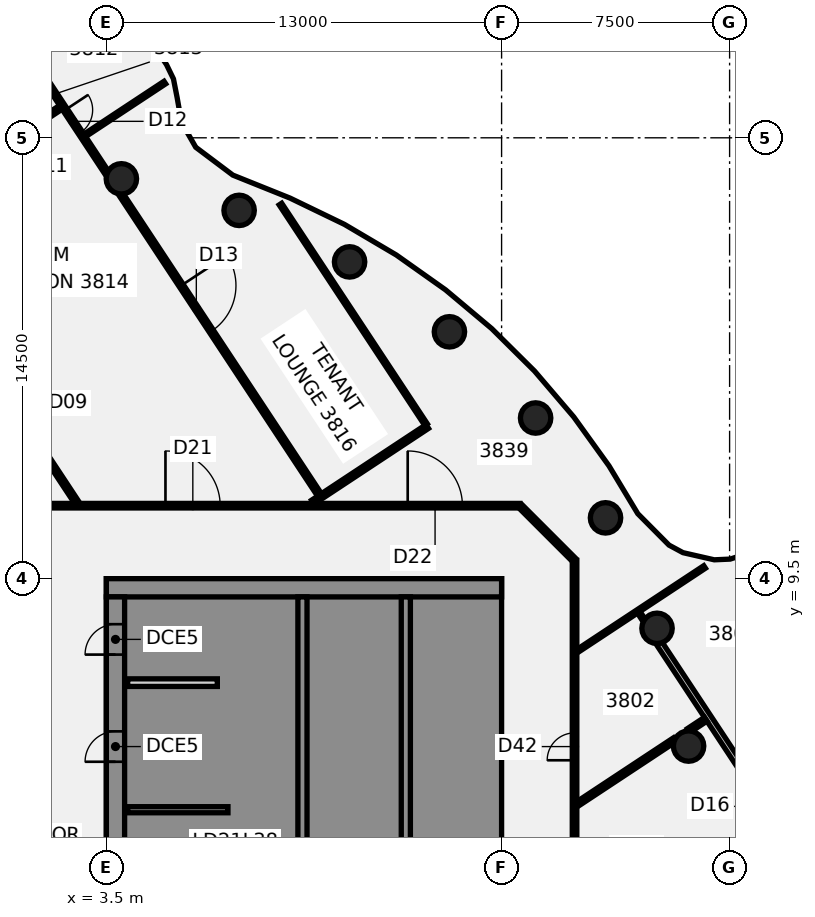
"""IFC4 building model, lengths in metres.
Left out: names, types, materials, properties, quantities, classifications, styles, units other than length and angle.
Written with IfcOpenShell. Run it as: python <this file> out.ifc"""

import sys

from ifc_helpers import new_model, si_unit, direction, frame, frame_2d, origin, origin_2d, place, context, subcontext, project, spatial, polyline, rectangle, circle, outline, extrude, element, fill, save


model = new_model("IFC4")
c1 = context("Model", 3, precision=1e-05, world=origin(), true_north=direction((0.0, 1.0)))
c2 = subcontext(c1, "Body", "Model", "MODEL_VIEW")
j1 = project(units=[si_unit("LENGTHUNIT", "METRE"), si_unit("PLANEANGLEUNIT", "RADIAN")], contexts=[c1])
p1 = place(None, origin())
s1 = spatial("IfcSite", under=j1, at=p1, CompositionType="ELEMENT")
p2 = place(p1, origin())
s2 = spatial("IfcBuilding", under=s1, at=p2, CompositionType="ELEMENT")
p3 = place(p2, frame((0.0, 0.0, 155.5)))
s3 = spatial("IfcBuildingStorey", under=s2, at=p3, CompositionType="ELEMENT", Elevation=155.5)
for number, where, z_axis, x_axis in (
    (1, (22.651, 3.994, -0.14), (0.0, 0.0, 1.0), (1.0, 0.0, 0.0)),
    (2, (21.613, 7.866, -0.14), (0.0, 0.0, 1.0), (1.0, 0.0, 0.0)),
    (3, (19.919, 11.5, -0.14), (0.0, 0.0, 1.0), (1.0, 0.0, 0.0)),
    (4, (17.619, 14.784, -0.14), (0.0, 0.0, 1.0), (1.0, 0.0, 0.0)),
    (5, (14.784, 17.619, -0.14), (0.0, 0.0, 1.0), (1.0, 0.0, 0.0)),
    (6, (11.5, 19.919, -0.14), (0.0, 0.0, 1.0), (1.0, 0.0, 0.0)),
    (7, (7.866, 21.613, -0.14), (0.0, 0.0, 1.0), (1.0, 0.0, 0.0)),
    (8, (3.994, 22.651, -0.14), (0.0, 0.0, 1.0), (1.0, 0.0, 0.0)),
):
    element("IfcColumn", number, at=place(p3, frame(where, z_axis=z_axis, x_axis=x_axis)), inside=s3, PredefinedType="COLUMN", context=c2, shape_type="SweptSolid", body=[
        extrude(circle(Radius=0.5, at=origin_2d()), origin(), (0.0, 0.0, 1.0), 3.75),
    ])
p4 = place(p3, frame((-3.565, 21.228, 0.0), z_axis=(0.0, 0.0, 1.0), x_axis=(0.55097538213, -0.834521496599, 0.0)))
e9 = element("IfcWall", 9, at=p4, inside=s3, PredefinedType="PARTITIONING", context=c2, shape_type="SweptSolid", body=[
    extrude(rectangle(XDim=11.058, YDim=0.15, at=frame_2d((5.529, 0.0))), origin(), (0.0, 0.0, 1.0), 3.01),
])
p5 = place(p4, frame((6.67, 0.0, 0.0)))
e10 = element("IfcOpeningElement", 10, at=p5, cuts=e9, PredefinedType="OPENING", context=c2, shape_type="SweptSolid", body=[
    extrude(rectangle(XDim=0.9, YDim=2.1, at=frame_2d((0.45, 1.05))), frame((0.0, 0.085, 0.0), z_axis=(0.0, -1.0, 0.0), x_axis=(1.0, 0.0, 0.0)), (0.0, 0.0, 1.0), 0.17),
])
p6 = place(p3, frame((0.799, 26.961, 0.0), z_axis=(0.0, 0.0, 1.0), x_axis=(0.55102221272, -0.834490575794, 0.0)))
e11 = element("IfcWall", 11, at=p6, inside=s3, PredefinedType="PARTITIONING", context=c2, shape_type="SweptSolid", body=[
    extrude(rectangle(XDim=5.139, YDim=0.15, at=frame_2d((2.57, 0.0))), origin(), (0.0, 0.0, 1.0), 3.01),
])
p7 = place(p6, frame((2.449, 0.0, 0.0)))
e12 = element("IfcOpeningElement", 12, at=p7, cuts=e11, PredefinedType="OPENING", context=c2, shape_type="SweptSolid", body=[
    extrude(rectangle(XDim=0.9, YDim=2.1, at=frame_2d((0.45, 1.05))), frame((0.0, 0.085, 0.0), z_axis=(0.0, -1.0, 0.0), x_axis=(1.0, 0.0, 0.0)), (0.0, 0.0, 1.0), 0.17),
])
p8 = place(p3, frame((3.879, 22.297, 0.0), z_axis=(0.0, 0.0, 1.0), x_axis=(0.551037271507, -0.834480632136, 0.0)))
e13 = element("IfcWall", 13, at=p8, inside=s3, PredefinedType="PARTITIONING", context=c2, shape_type="SweptSolid", body=[
    extrude(rectangle(XDim=12.03, YDim=0.15, at=frame_2d((6.015, 0.0))), origin(), (0.0, 0.0, 1.0), 3.01),
])
p9 = place(p8, frame((3.782, 0.0, 0.0)))
e14 = element("IfcOpeningElement", 14, at=p9, cuts=e13, PredefinedType="OPENING", context=c2, shape_type="SweptSolid", body=[
    extrude(rectangle(XDim=1.8, YDim=2.1, at=frame_2d((0.9, 1.05))), frame((0.0, 0.085, 0.0), z_axis=(0.0, -1.0, 0.0), x_axis=(1.0, 0.0, 0.0)), (0.0, 0.0, 1.0), 0.17),
])
p10 = place(p3, frame((9.226, 21.82, 0.0), z_axis=(0.0, 0.0, 1.0), x_axis=(0.550974071804, -0.834522361713, 0.0)))
e15 = element("IfcWall", 15, at=p10, inside=s3, PredefinedType="PARTITIONING", context=c2, shape_type="SweptSolid", body=[
    extrude(rectangle(XDim=8.692, YDim=0.1, at=frame_2d((4.346, 0.0))), origin(), (0.0, 0.0, 1.0), 3.01),
])
p11 = place(p3, frame((21.011, 8.394, 0.0), z_axis=(0.0, 0.0, 1.0), x_axis=(0.551266985396, -0.834328898464, 0.0)))
e16 = element("IfcWall", 16, at=p11, inside=s3, PredefinedType="PARTITIONING", context=c2, shape_type="SweptSolid", body=[
    extrude(rectangle(XDim=0.312, YDim=0.1, at=frame_2d((0.156, 0.0))), origin(), (0.0, 0.0, 1.0), 3.01),
])
p12 = place(p3, frame((21.684, 7.375, 0.0), z_axis=(0.0, 0.0, 1.0), x_axis=(0.550962555751, -0.834529964806, 0.0)))
e17 = element("IfcWall", 17, at=p12, inside=s3, PredefinedType="PARTITIONING", context=c2, shape_type="SweptSolid", body=[
    extrude(rectangle(XDim=13.028, YDim=0.2, at=frame_2d((6.514, 0.0))), origin(), (0.0, 0.0, 1.0), 3.01),
])
p13 = place(p12, frame((5.729, 0.0, 0.0)))
e18 = element("IfcOpeningElement", 18, at=p13, cuts=e17, PredefinedType="OPENING", context=c2, shape_type="SweptSolid", body=[
    extrude(rectangle(XDim=1.4, YDim=2.1, at=frame_2d((0.7, 1.05))), frame((0.0, 0.11, 0.0), z_axis=(0.0, -1.0, 0.0), x_axis=(1.0, 0.0, 0.0)), (0.0, 0.0, 1.0), 0.22),
])
p14 = place(p3, frame((17.128, 11.872, 0.0), z_axis=(0.0, 0.0, 1.0), x_axis=(0.707106781187, -0.707106781187, 0.0)))
e19 = element("IfcWall", 19, at=p14, inside=s3, PredefinedType="PARTITIONING", context=c2, shape_type="SweptSolid", body=[
    extrude(rectangle(XDim=2.465, YDim=0.15, at=frame_2d((1.232, 0.0))), origin(), (0.0, 0.0, 1.0), 3.01),
])
p15 = place(p3, frame((-17.065, 11.9, 0.0), z_axis=(0.0, 0.0, 1.0), x_axis=(1.0, 0.0, 0.0)))
e20 = element("IfcWall", 20, at=p15, inside=s3, PredefinedType="PARTITIONING", context=c2, shape_type="SweptSolid", body=[
    extrude(rectangle(XDim=34.165, YDim=0.15, at=frame_2d((17.083, 0.0))), origin(), (0.0, 0.0, 1.0), 3.01),
])
p16 = place(p15, frame((22.509, 0.0, 0.0)))
e21 = element("IfcOpeningElement", 21, at=p16, cuts=e20, PredefinedType="OPENING", context=c2, shape_type="SweptSolid", body=[
    extrude(rectangle(XDim=1.8, YDim=2.1, at=frame_2d((0.9, 1.05))), frame((0.0, 0.085, 0.0), z_axis=(0.0, -1.0, 0.0), x_axis=(1.0, 0.0, 0.0)), (0.0, 0.0, 1.0), 0.17),
])
p17 = place(p15, frame((30.477, 0.0, 0.0)))
e22 = element("IfcOpeningElement", 22, at=p17, cuts=e20, PredefinedType="OPENING", context=c2, shape_type="SweptSolid", body=[
    extrude(rectangle(XDim=1.8, YDim=2.1, at=frame_2d((0.9, 1.05))), frame((0.0, 0.085, 0.0), z_axis=(0.0, -1.0, 0.0), x_axis=(1.0, 0.0, 0.0)), (0.0, 0.0, 1.0), 0.17),
])
p18 = place(p15, frame((8.334, 0.0, 0.0)))
e23 = element("IfcOpeningElement", 23, at=p18, cuts=e20, PredefinedType="OPENING", context=c2, shape_type="SweptSolid", body=[
    extrude(rectangle(XDim=1.8, YDim=2.1, at=frame_2d((0.9, 1.05))), frame((0.0, 0.085, 0.0), z_axis=(0.0, -1.0, 0.0), x_axis=(1.0, 0.0, 0.0)), (0.0, 0.0, 1.0), 0.17),
])
p19 = place(p3, frame((2.795, 24.082, 0.0), z_axis=(0.0, 0.0, 1.0), x_axis=(0.83472341034, 0.550669436441, 0.0)))
e24 = element("IfcWall", 24, at=p19, inside=s3, PredefinedType="PARTITIONING", context=c2, shape_type="SweptSolid", body=[
    extrude(rectangle(XDim=3.15, YDim=0.1, at=frame_2d((1.575, 0.0))), origin(), (0.0, 0.0, 1.0), 3.01),
])
p20 = place(p3, frame((-7.567, 21.559, 0.0), z_axis=(0.0, 0.0, 1.0), x_axis=(0.834644793963, 0.55078858731, 0.0)))
e25 = element("IfcWall", 25, at=p20, inside=s3, PredefinedType="PARTITIONING", context=c2, shape_type="SweptSolid", body=[
    extrude(rectangle(XDim=13.257, YDim=0.2, at=frame_2d((6.629, 0.0))), origin(), (0.0, 0.0, 1.0), 3.01),
])
p21 = place(p20, frame((5.658, 0.0, 0.0)))
e26 = element("IfcOpeningElement", 26, at=p21, cuts=e25, PredefinedType="OPENING", context=c2, shape_type="SweptSolid", body=[
    extrude(rectangle(XDim=1.4, YDim=2.1, at=frame_2d((0.7, 1.05))), frame((0.0, 0.11, 0.0), z_axis=(0.0, -1.0, 0.0), x_axis=(1.0, 0.0, 0.0)), (0.0, 0.0, 1.0), 0.22),
])
p22 = place(p3, frame((0.396, 23.941, 0.0), z_axis=(0.0, 0.0, 1.0), x_axis=(0.834370825501, 0.551203524619, 0.0)))
e27 = element("IfcWall", 27, at=p22, inside=s3, PredefinedType="PARTITIONING", context=c2, shape_type="SweptSolid", body=[
    extrude(rectangle(XDim=1.92, YDim=0.15, at=frame_2d((0.96, 0.0))), origin(), (0.0, 0.0, 1.0), 3.01),
])
p23 = place(p3, frame((10.292, 12.019, 0.0), z_axis=(0.0, 0.0, 1.0), x_axis=(0.834523303169, 0.550972645844, 0.0)))
e28 = element("IfcWall", 28, at=p23, inside=s3, PredefinedType="PARTITIONING", context=c2, shape_type="SweptSolid", body=[
    extrude(rectangle(XDim=4.511, YDim=0.15, at=frame_2d((2.255, 0.0))), origin(), (0.0, 0.0, 1.0), 3.01),
])
p24 = place(p3, frame((19.0, 2.093, 0.0), z_axis=(0.0, 0.0, 1.0), x_axis=(0.834493361806, 0.551017993446, 0.0)))
e29 = element("IfcWall", 29, at=p24, inside=s3, PredefinedType="PARTITIONING", context=c2, shape_type="SweptSolid", body=[
    extrude(rectangle(XDim=3.831, YDim=0.15, at=frame_2d((1.916, 0.0))), origin(), (0.0, 0.0, 1.0), 3.01),
])
p25 = place(p3, frame((22.651, 4.504, 0.0), z_axis=(0.0, 0.0, 1.0), x_axis=(0.834599435949, 0.550857315022, 0.0)))
e30 = element("IfcWall", 30, at=p25, inside=s3, PredefinedType="PARTITIONING", context=c2, shape_type="SweptSolid", body=[
    extrude(rectangle(XDim=0.676, YDim=0.15, at=frame_2d((0.338, 0.0))), origin(), (0.0, 0.0, 1.0), 3.01),
])
p26 = place(p3, frame((18.983, 7.115, 0.0), z_axis=(0.0, 0.0, 1.0), x_axis=(0.834486104681, 0.551028983898, 0.0)))
e31 = element("IfcWall", 31, at=p26, inside=s3, PredefinedType="PARTITIONING", context=c2, shape_type="SweptSolid", body=[
    extrude(rectangle(XDim=5.026, YDim=0.1, at=frame_2d((2.513, 0.0))), origin(), (0.0, 0.0, 1.0), 3.01),
])
p27 = place(p3, frame((18.9, -10.1, 0.0), z_axis=(0.0, 0.0, 1.0), x_axis=(0.0, 1.0, 0.0)))
e32 = element("IfcWall", 32, at=p27, inside=s3, PredefinedType="PARTITIONING", context=c2, shape_type="SweptSolid", body=[
    extrude(rectangle(XDim=20.2, YDim=0.15, at=frame_2d((10.1, 0.0))), origin(), (0.0, 0.0, 1.0), 3.01),
])
p28 = place(p27, frame((8.179, 0.0, 0.0)))
e33 = element("IfcOpeningElement", 33, at=p28, cuts=e32, PredefinedType="OPENING", context=c2, shape_type="SweptSolid", body=[
    extrude(rectangle(XDim=1.8, YDim=2.1, at=frame_2d((0.9, 1.05))), frame((0.0, 0.085, 0.0), z_axis=(0.0, -1.0, 0.0), x_axis=(1.0, 0.0, 0.0)), (0.0, 0.0, 1.0), 0.17),
])
p29 = place(p27, frame((13.627, 0.0, 0.0)))
e34 = element("IfcOpeningElement", 34, at=p29, cuts=e32, PredefinedType="OPENING", context=c2, shape_type="SweptSolid", body=[
    extrude(rectangle(XDim=0.9, YDim=2.1, at=frame_2d((0.45, 1.05))), frame((0.0, 0.085, 0.0), z_axis=(0.0, -1.0, 0.0), x_axis=(1.0, 0.0, 0.0)), (0.0, 0.0, 1.0), 0.17),
])
p30 = place(p3, origin())
e35 = element("IfcWall", 35, at=p30, inside=s3, PredefinedType="SHEAR", context=c2, shape_type="SweptSolid", body=[
    extrude(outline(polyline([(13.5, -8.125), (13.5, -8.9), (15.9, -8.9), (16.5, -8.9), (16.5, 8.9), (15.9, 8.9), (13.5, 8.9), (13.5, 8.125), (15.9, 8.125), (15.9, 5.625), (13.5, 5.625), (13.5, 5.375), (15.9, 5.375), (15.9, -5.375), (13.5, -5.375), (13.5, -5.625), (15.9, -5.625), (15.9, -8.125), (13.5, -8.125)])), origin(), (0.0, 0.0, 1.0), 3.61),
])
p31 = place(p3, frame((16.5, 9.2, 0.0), z_axis=(0.0, 0.0, 1.0), x_axis=(-1.0, 0.0, 0.0)))
e36 = element("IfcWall", 36, at=p31, inside=s3, PredefinedType="SHEAR", context=c2, shape_type="SweptSolid", body=[
    extrude(rectangle(XDim=13.0, YDim=0.6, at=frame_2d((6.5, 0.0))), origin(), (0.0, 0.0, 1.0), 3.61),
])
p32 = place(p3, origin())
e37 = element("IfcWall", 37, at=p32, inside=s3, PredefinedType="SHEAR", context=c2, shape_type="SweptSolid", body=[
    extrude(outline(polyline([(9.8, -5.375), (7.5, -5.375), (7.5, -2.875), (9.8, -2.875), (9.8, -2.625), (7.5, -2.625), (7.5, -0.125), (9.8, -0.125), (9.8, 0.125), (7.5, 0.125), (7.5, 2.625), (9.8, 2.625), (9.8, 2.875), (7.5, 2.875), (7.5, 5.375), (9.8, 5.375), (9.8, 5.625), (7.5, 5.625), (7.5, 8.125), (9.8, 8.125), (9.8, 8.9), (7.5, 8.9), (7.2, 8.9), (7.2, -5.625), (7.5, -5.625), (9.8, -5.625), (9.8, -5.375)])), origin(), (0.0, 0.0, 1.0), 3.61),
])
p33 = place(p3, frame((7.5, 1.9, 0.0), z_axis=(0.0, 0.0, 1.0), x_axis=(-1.0, 0.0, 0.0)))
e38 = element("IfcWall", 38, at=p33, inside=s3, PredefinedType="SHEAR", context=c2, shape_type="SweptSolid", body=[
    extrude(rectangle(XDim=3.3, YDim=0.2, at=frame_2d((1.65, 0.0))), origin(), (0.0, 0.0, 1.0), 3.61),
])
p34 = place(p3, frame((13.35, -8.9, 0.0), z_axis=(0.0, 0.0, 1.0), x_axis=(0.0, 1.0, 0.0)))
e39 = element("IfcWall", 39, at=p34, inside=s3, PredefinedType="SHEAR", context=c2, shape_type="SweptSolid", body=[
    extrude(rectangle(XDim=17.8, YDim=0.3, at=frame_2d((8.9, 0.0))), origin(), (0.0, 0.0, 1.0), 3.61),
])
p35 = place(p34, frame((1.325, 0.0, 0.0)))
e40 = element("IfcOpeningElement", 40, at=p35, cuts=e39, PredefinedType="OPENING", context=c2, shape_type="SweptSolid", body=[
    extrude(rectangle(XDim=1.4, YDim=2.1, at=frame_2d((0.7, 1.05))), frame((0.0, 0.16, 0.0), z_axis=(0.0, -1.0, 0.0), x_axis=(1.0, 0.0, 0.0)), (0.0, 0.0, 1.0), 0.32),
])
p36 = place(p34, frame((8.4, 0.0, 0.0)))
e41 = element("IfcOpeningElement", 41, at=p36, cuts=e39, PredefinedType="OPENING", context=c2, shape_type="SweptSolid", body=[
    extrude(rectangle(XDim=1.0, YDim=2.1, at=frame_2d((0.5, 1.05))), frame((0.0, 0.16, 0.0), z_axis=(0.0, -1.0, 0.0), x_axis=(1.0, 0.0, 0.0)), (0.0, 0.0, 1.0), 0.32),
])
p37 = place(p3, frame((9.95, -8.9, 0.0), z_axis=(0.0, 0.0, 1.0), x_axis=(0.0, 1.0, 0.0)))
e42 = element("IfcWall", 42, at=p37, inside=s3, PredefinedType="SHEAR", context=c2, shape_type="SweptSolid", body=[
    extrude(rectangle(XDim=17.8, YDim=0.3, at=frame_2d((8.9, 0.0))), origin(), (0.0, 0.0, 1.0), 3.61),
])
p38 = place(p37, frame((4.175, 0.0, 0.0)))
e43 = element("IfcOpeningElement", 43, at=p38, cuts=e42, PredefinedType="OPENING", context=c2, shape_type="SweptSolid", body=[
    extrude(rectangle(XDim=1.2, YDim=2.1, at=frame_2d((0.6, 1.05))), frame((0.0, 0.16, 0.0), z_axis=(0.0, -1.0, 0.0), x_axis=(1.0, 0.0, 0.0)), (0.0, 0.0, 1.0), 0.32),
])
p39 = place(p37, frame((6.925, 0.0, 0.0)))
e44 = element("IfcOpeningElement", 44, at=p39, cuts=e42, PredefinedType="OPENING", context=c2, shape_type="SweptSolid", body=[
    extrude(rectangle(XDim=1.2, YDim=2.1, at=frame_2d((0.6, 1.05))), frame((0.0, 0.16, 0.0), z_axis=(0.0, -1.0, 0.0), x_axis=(1.0, 0.0, 0.0)), (0.0, 0.0, 1.0), 0.32),
])
p40 = place(p3, frame((3.8, -8.9, 0.0), z_axis=(0.0, 0.0, 1.0), x_axis=(0.0, 1.0, 0.0)))
e45 = element("IfcWall", 45, at=p40, inside=s3, PredefinedType="SHEAR", context=c2, shape_type="SweptSolid", body=[
    extrude(rectangle(XDim=17.8, YDim=0.6, at=frame_2d((8.9, 0.0))), origin(), (0.0, 0.0, 1.0), 3.61),
])
p41 = place(p40, frame((1.25, 0.0, 0.0)))
e46 = element("IfcOpeningElement", 46, at=p41, cuts=e45, PredefinedType="OPENING", context=c2, shape_type="SweptSolid", body=[
    extrude(rectangle(XDim=1.8, YDim=2.1, at=frame_2d((0.9, 1.05))), frame((0.0, 0.31, 0.0), z_axis=(0.0, -1.0, 0.0), x_axis=(1.0, 0.0, 0.0)), (0.0, 0.0, 1.0), 0.62),
])
p42 = place(p40, frame((12.377, 0.0, 0.0)))
e47 = element("IfcOpeningElement", 47, at=p42, cuts=e45, PredefinedType="OPENING", context=c2, shape_type="SweptSolid", body=[
    extrude(rectangle(XDim=1.0, YDim=2.1, at=frame_2d((0.5, 1.05))), frame((0.0, 0.31, 0.0), z_axis=(0.0, -1.0, 0.0), x_axis=(1.0, 0.0, 0.0)), (0.0, 0.0, 1.0), 0.62),
])
p43 = place(p40, frame((15.903, 0.0, 0.0)))
e48 = element("IfcOpeningElement", 48, at=p43, cuts=e45, PredefinedType="OPENING", context=c2, shape_type="SweptSolid", body=[
    extrude(rectangle(XDim=1.0, YDim=2.1, at=frame_2d((0.5, 1.05))), frame((0.0, 0.31, 0.0), z_axis=(0.0, -1.0, 0.0), x_axis=(1.0, 0.0, 0.0)), (0.0, 0.0, 1.0), 0.62),
])
p44 = place(p3, frame((7.15, 6.08, 0.0), z_axis=(0.0, 0.0, 1.0), x_axis=(-1.0, 0.0, 0.0)))
e49 = element("IfcWall", 49, at=p44, inside=s3, PredefinedType="PARTITIONING", context=c2, shape_type="SweptSolid", body=[
    extrude(rectangle(XDim=2.95, YDim=0.25, at=frame_2d((1.475, 0.0))), origin(), (0.0, 0.0, 1.0), 3.61),
])
p45 = place(p7, origin())
e50 = element("IfcDoor", 50, at=p45, inside=s3, OperationType="SINGLE_SWING_LEFT", PredefinedType="DOOR", context=c2, shape_type="SweptSolid", body=[
    extrude(rectangle(XDim=0.9, YDim=2.1, at=frame_2d((0.45, 1.05))), frame((0.0, 0.025, 0.0), z_axis=(0.0, -1.0, 0.0), x_axis=(1.0, 0.0, 0.0)), (0.0, 0.0, 1.0), 0.05),
])
fill(e12, e50)
p46 = place(p9, origin())
e51 = element("IfcDoor", 51, at=p46, inside=s3, OperationType="DOUBLE_DOOR_SINGLE_SWING", PredefinedType="DOOR", context=c2, shape_type="SweptSolid", body=[
    extrude(rectangle(XDim=1.8, YDim=2.1, at=frame_2d((0.9, 1.05))), frame((0.0, 0.025, 0.0), z_axis=(0.0, -1.0, 0.0), x_axis=(1.0, 0.0, 0.0)), (0.0, 0.0, 1.0), 0.05),
])
fill(e14, e51)
p47 = place(p16, frame((1.8, 0.0, 0.0), z_axis=(0.0, 0.0, 1.0), x_axis=(-1.0, 0.0, 0.0)))
e52 = element("IfcDoor", 52, at=p47, inside=s3, OperationType="DOUBLE_DOOR_SINGLE_SWING", PredefinedType="DOOR", context=c2, shape_type="SweptSolid", body=[
    extrude(rectangle(XDim=1.8, YDim=2.1, at=frame_2d((0.9, 1.05))), frame((0.0, 0.025, 0.0), z_axis=(0.0, -1.0, 0.0), x_axis=(1.0, 0.0, 0.0)), (0.0, 0.0, 1.0), 0.05),
])
fill(e21, e52)
p48 = place(p17, origin())
e53 = element("IfcDoor", 53, at=p48, inside=s3, OperationType="DOUBLE_DOOR_SINGLE_SWING", PredefinedType="DOOR", context=c2, shape_type="SweptSolid", body=[
    extrude(rectangle(XDim=1.8, YDim=2.1, at=frame_2d((0.9, 1.05))), frame((0.0, 0.025, 0.0), z_axis=(0.0, -1.0, 0.0), x_axis=(1.0, 0.0, 0.0)), (0.0, 0.0, 1.0), 0.05),
])
fill(e22, e53)
p49 = place(p29, frame((0.9, 0.0, 0.0), z_axis=(0.0, 0.0, 1.0), x_axis=(-1.0, 0.0, 0.0)))
e54 = element("IfcDoor", 54, at=p49, inside=s3, OperationType="SINGLE_SWING_RIGHT", PredefinedType="DOOR", context=c2, shape_type="SweptSolid", body=[
    extrude(rectangle(XDim=0.9, YDim=2.1, at=frame_2d((0.45, 1.05))), frame((0.0, 0.025, 0.0), z_axis=(0.0, -1.0, 0.0), x_axis=(1.0, 0.0, 0.0)), (0.0, 0.0, 1.0), 0.05),
])
fill(e34, e54)
p50 = place(p42, origin())
e55 = element("IfcDoor", 55, at=p50, inside=s3, OperationType="SINGLE_SWING_LEFT", PredefinedType="DOOR", context=c2, shape_type="SweptSolid", body=[
    extrude(rectangle(XDim=1.0, YDim=2.1, at=frame_2d((0.5, 1.05))), frame((0.0, -0.225, 0.0), z_axis=(0.0, -1.0, 0.0), x_axis=(1.0, 0.0, 0.0)), (0.0, 0.0, 1.0), 0.05),
])
fill(e47, e55)
p51 = place(p43, origin())
e56 = element("IfcDoor", 56, at=p51, inside=s3, OperationType="SINGLE_SWING_LEFT", PredefinedType="DOOR", context=c2, shape_type="SweptSolid", body=[
    extrude(rectangle(XDim=1.0, YDim=2.1, at=frame_2d((0.5, 1.05))), frame((0.0, -0.225, 0.0), z_axis=(0.0, -1.0, 0.0), x_axis=(1.0, 0.0, 0.0)), (0.0, 0.0, 1.0), 0.05),
])
fill(e48, e56)
save(model, sys.argv[1])
